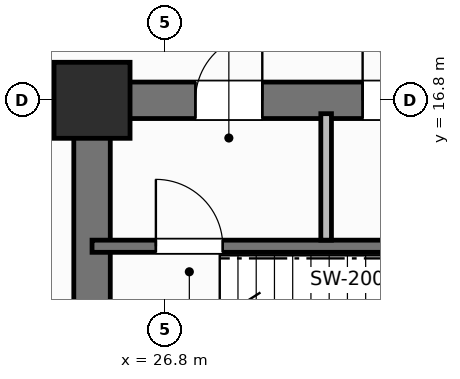
"""IFC4 building model, lengths in metres.
Left out: names, types, materials, properties, quantities, classifications, styles, units other than length and angle.
Written with IfcOpenShell. Run it as: python <this file> out.ifc"""

import sys

from ifc_helpers import new_model, si_unit, direction, frame, frame_2d, origin, origin_2d, place, context, subcontext, project, spatial, rectangle, extrude, element, fill, save


model = new_model("IFC4")
c1 = context("Model", 3, precision=1e-05, world=origin(), true_north=direction((0.0, 1.0)))
c2 = subcontext(c1, "Body", "Model", "MODEL_VIEW")
j1 = project(units=[si_unit("LENGTHUNIT", "METRE"), si_unit("PLANEANGLEUNIT", "RADIAN")], contexts=[c1])
p1 = place(None, origin())
s1 = spatial("IfcSite", under=j1, at=p1, CompositionType="ELEMENT")
p2 = place(p1, origin())
s2 = spatial("IfcBuilding", under=s1, at=p2, CompositionType="ELEMENT")
p3 = place(p2, frame((0.0, 0.0, 39.9)))
s3 = spatial("IfcBuildingStorey", under=s2, at=p3, CompositionType="ELEMENT", Elevation=39.9)
p4 = place(p3, frame((25.6, 10.9, 0.0), z_axis=(0.0, 0.0, 1.0), x_axis=(0.0, 1.0, 0.0)))
e1 = element("IfcWall", 1, at=p4, inside=s3, PredefinedType="SHEAR", context=c2, shape_type="SweptSolid", body=[
    extrude(rectangle(XDim=5.6, YDim=0.6, at=frame_2d((2.8, 0.0))), origin(), (0.0, 0.0, 1.0), 3.7),
])
p5 = place(p3, frame((25.6, 16.8, 0.0), z_axis=(0.0, 0.0, 1.0), x_axis=(1.0, 0.0, 0.0)))
e2 = element("IfcWall", 2, at=p5, inside=s3, PredefinedType="SHEAR", context=c2, shape_type="SweptSolid", body=[
    extrude(rectangle(XDim=27.2, YDim=0.6, at=frame_2d((13.6, 0.0))), origin(), (0.0, 0.0, 1.0), 3.7),
])
p6 = place(p5, frame((1.7, 0.0, 0.0)))
e3 = element("IfcOpeningElement", 3, at=p6, cuts=e2, PredefinedType="OPENING", context=c2, shape_type="SweptSolid", body=[
    extrude(rectangle(XDim=1.1, YDim=2.15, at=frame_2d((0.55, 1.075))), frame((0.0, 0.31, 0.0), z_axis=(0.0, -1.0, 0.0), x_axis=(1.0, 0.0, 0.0)), (0.0, 0.0, 1.0), 0.62),
])
p7 = place(p5, frame((4.45, 0.0, 0.0)))
e4 = element("IfcOpeningElement", 4, at=p7, cuts=e2, PredefinedType="OPENING", context=c2, shape_type="SweptSolid", body=[
    extrude(rectangle(XDim=0.85, YDim=2.1, at=frame_2d((0.425, 1.05))), frame((0.0, 0.31, 0.0), z_axis=(0.0, -1.0, 0.0), x_axis=(1.0, 0.0, 0.0)), (0.0, 0.0, 1.0), 0.62),
])
p8 = place(p5, frame((6.5, 0.0, 0.0)))
e5 = element("IfcOpeningElement", 5, at=p8, cuts=e2, PredefinedType="OPENING", context=c2, shape_type="SweptSolid", body=[
    extrude(rectangle(XDim=0.85, YDim=2.1, at=frame_2d((0.425, 1.05))), frame((0.0, 0.31, 0.0), z_axis=(0.0, -1.0, 0.0), x_axis=(1.0, 0.0, 0.0)), (0.0, 0.0, 1.0), 0.62),
])
p9 = place(p5, frame((13.0, 0.0, 0.0)))
e6 = element("IfcOpeningElement", 6, at=p9, cuts=e2, PredefinedType="OPENING", context=c2, shape_type="SweptSolid", body=[
    extrude(rectangle(XDim=1.2, YDim=2.15, at=frame_2d((0.6, 1.075))), frame((0.0, 0.31, 0.0), z_axis=(0.0, -1.0, 0.0), x_axis=(1.0, 0.0, 0.0)), (0.0, 0.0, 1.0), 0.62),
])
p10 = place(p5, frame((20.4, 0.0, 0.0)))
e7 = element("IfcOpeningElement", 7, at=p10, cuts=e2, PredefinedType="OPENING", context=c2, shape_type="SweptSolid", body=[
    extrude(rectangle(XDim=1.3, YDim=2.2, at=frame_2d((0.65, 1.1))), frame((0.0, 0.31, 0.0), z_axis=(0.0, -1.0, 0.0), x_axis=(1.0, 0.0, 0.0)), (0.0, 0.0, 1.0), 0.62),
])
p11 = place(p5, frame((24.65, 0.0, 0.0)))
e8 = element("IfcOpeningElement", 8, at=p11, cuts=e2, PredefinedType="OPENING", context=c2, shape_type="SweptSolid", body=[
    extrude(rectangle(XDim=0.85, YDim=2.1, at=frame_2d((0.425, 1.05))), frame((0.0, 0.31, 0.0), z_axis=(0.0, -1.0, 0.0), x_axis=(1.0, 0.0, 0.0)), (0.0, 0.0, 1.0), 0.62),
])
p12 = place(p3, frame((25.6, 16.8, 0.0), z_axis=(0.0, 0.0, 1.0), x_axis=(1.0, 0.0, 0.0)))
e9 = element("IfcColumn", 9, at=p12, inside=s3, PredefinedType="COLUMN", context=c2, shape_type="SweptSolid", body=[
    extrude(rectangle(XDim=1.25, YDim=1.25, at=origin_2d()), origin(), (0.0, 0.0, 1.0), 3.7),
])
p13 = place(p3, frame((25.6, 14.4, 0.0), z_axis=(0.0, 0.0, 1.0), x_axis=(1.0, 0.0, 0.0)))
e10 = element("IfcWall", 10, at=p13, inside=s3, PredefinedType="SHEAR", context=c2, shape_type="SweptSolid", body=[
    extrude(rectangle(XDim=9.55, YDim=0.2, at=frame_2d((4.775, 0.0))), origin(), (0.0, 0.0, 1.0), 3.7),
])
p14 = place(p13, frame((1.05, 0.0, 0.0)))
e11 = element("IfcOpeningElement", 11, at=p14, cuts=e10, PredefinedType="OPENING", context=c2, shape_type="SweptSolid", body=[
    extrude(rectangle(XDim=1.1, YDim=2.15, at=frame_2d((0.55, 1.075))), frame((0.0, 0.11, 0.0), z_axis=(0.0, -1.0, 0.0), x_axis=(1.0, 0.0, 0.0)), (0.0, 0.0, 1.0), 0.22),
])
p15 = place(p3, frame((29.45, 14.5, 0.0), z_axis=(0.0, 0.0, 1.0), x_axis=(0.0, 1.0, 0.0)))
e12 = element("IfcWall", 12, at=p15, inside=s3, PredefinedType="PARTITIONING", context=c2, shape_type="SweptSolid", body=[
    extrude(rectangle(XDim=2.08, YDim=0.175, at=frame_2d((1.04, 0.0))), origin(), (0.0, 0.0, 1.0), 2.53),
])
p16 = place(p14, origin())
e13 = element("IfcDoor", 13, at=p16, inside=s3, OperationType="SINGLE_SWING_LEFT", PredefinedType="DOOR", context=c2, shape_type="SweptSolid", body=[
    extrude(rectangle(XDim=1.1, YDim=2.15, at=frame_2d((0.55, 1.075))), frame((0.0, 0.025, 0.0), z_axis=(0.0, -1.0, 0.0), x_axis=(1.0, 0.0, 0.0)), (0.0, 0.0, 1.0), 0.05),
])
fill(e11, e13)
p17 = place(p6, origin())
e14 = element("IfcDoor", 14, at=p17, inside=s3, OperationType="SINGLE_SWING_RIGHT", PredefinedType="DOOR", context=c2, shape_type="SweptSolid", body=[
    extrude(rectangle(XDim=1.1, YDim=2.15, at=frame_2d((0.55, 1.075))), frame((0.0, 0.025, 0.0), z_axis=(0.0, -1.0, 0.0), x_axis=(1.0, 0.0, 0.0)), (0.0, 0.0, 1.0), 0.05),
])
fill(e3, e14)
p18 = place(p7, origin())
e15 = element("IfcDoor", 15, at=p18, inside=s3, OperationType="SINGLE_SWING_LEFT", PredefinedType="DOOR", context=c2, shape_type="SweptSolid", body=[
    extrude(rectangle(XDim=0.85, YDim=2.1, at=frame_2d((0.425, 1.05))), frame((0.0, 0.025, 0.0), z_axis=(0.0, -1.0, 0.0), x_axis=(1.0, 0.0, 0.0)), (0.0, 0.0, 1.0), 0.05),
])
fill(e4, e15)
save(model, sys.argv[1])
